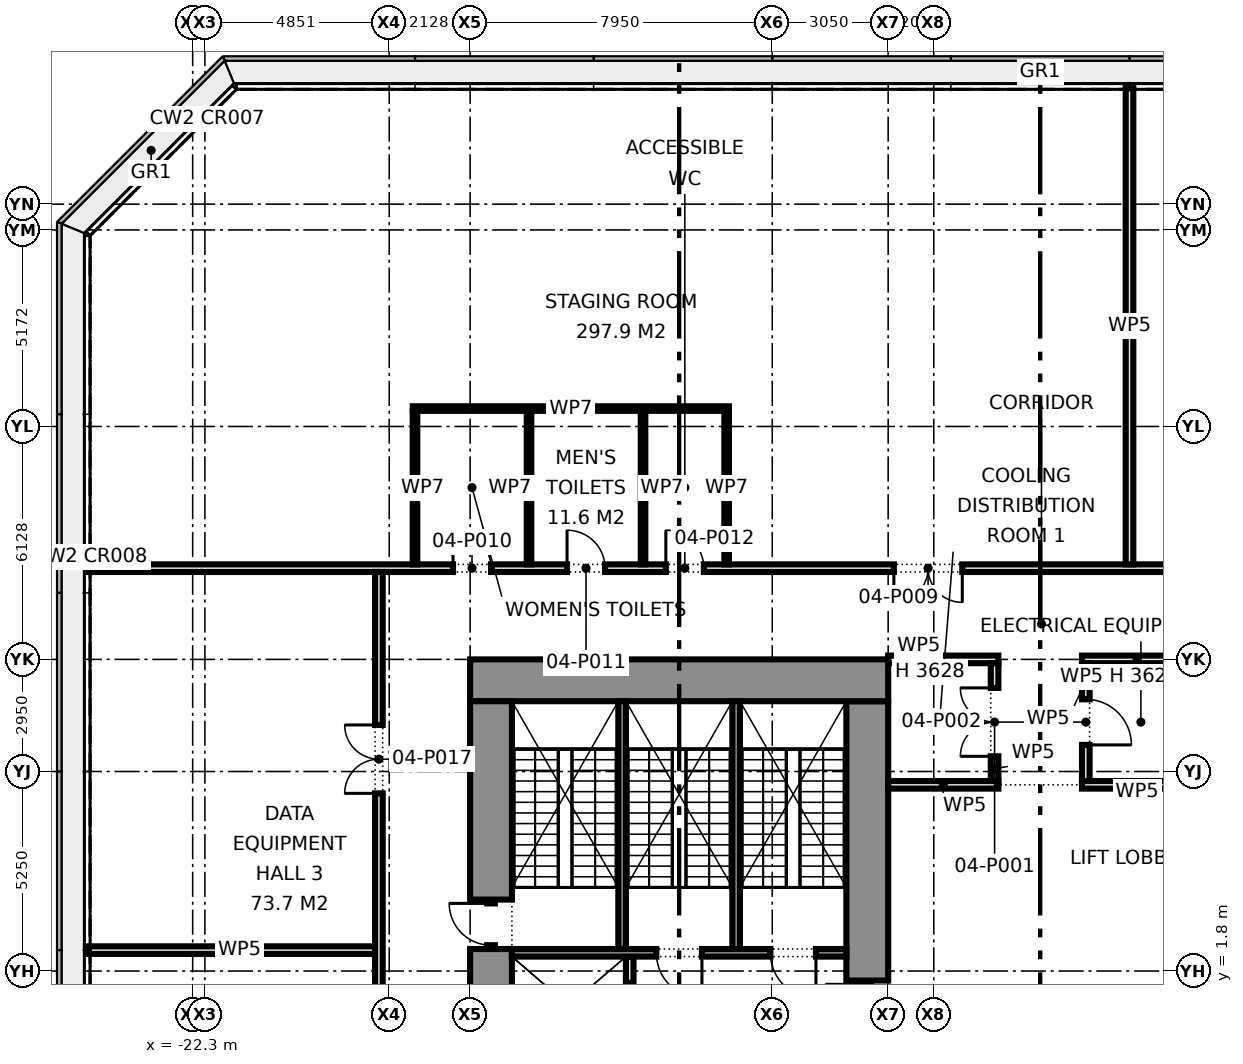
"""IFC4 building model, lengths in metres.
Left out: names, types, materials, properties, quantities, classifications, styles, units other than length and angle.
Written with IfcOpenShell. Run it as: python <this file> out.ifc"""

import sys

from ifc_helpers import new_model, si_unit, direction, frame, frame_2d, origin, place, context, subcontext, project, spatial, rectangle, extrude, element, fill, save


model = new_model("IFC4")
c1 = context("Model", 3, precision=1e-05, world=origin(), true_north=direction((0.0, 1.0)))
c2 = subcontext(c1, "Body", "Model", "MODEL_VIEW")
j1 = project(units=[si_unit("LENGTHUNIT", "METRE"), si_unit("PLANEANGLEUNIT", "RADIAN")], contexts=[c1])
p1 = place(None, origin())
s1 = spatial("IfcSite", under=j1, at=p1, CompositionType="ELEMENT")
p2 = place(p1, origin())
s2 = spatial("IfcBuilding", under=s1, at=p2, CompositionType="ELEMENT")
p3 = place(p2, frame((0.0, 0.0, 16.1)))
s3 = spatial("IfcBuildingStorey", under=s2, at=p3, CompositionType="ELEMENT", Elevation=16.1)
p4 = place(p3, frame((-15.0, 9.45, 0.0), z_axis=(0.0, 0.0, 1.0), x_axis=(1.0, 0.0, 0.0)))
e1 = element("IfcWall", 1, at=p4, inside=s3, PredefinedType="SHEAR", context=c2, shape_type="SweptSolid", body=[
    extrude(rectangle(XDim=11.0, YDim=1.1, at=frame_2d((5.5, 0.0))), origin(), (0.0, 0.0, 1.0), 4.575),
])
p5 = place(p3, frame((-14.45, -3.75, 0.0), z_axis=(0.0, 0.0, 1.0), x_axis=(0.0, 1.0, 0.0)))
e2 = element("IfcWall", 2, at=p5, inside=s3, PredefinedType="SHEAR", context=c2, shape_type="SweptSolid", body=[
    extrude(rectangle(XDim=6.13, YDim=1.1, at=frame_2d((3.065, 0.0))), origin(), (0.0, 0.0, 1.0), 4.575),
])
p6 = place(p3, frame((-14.45, 2.38, 0.0), z_axis=(0.0, 0.0, 1.0), x_axis=(0.0, 1.0, 0.0)))
e3 = element("IfcWall", 3, at=p6, inside=s3, PredefinedType="SHEAR", context=c2, shape_type="SweptSolid", body=[
    extrude(rectangle(XDim=1.3, YDim=0.2, at=frame_2d((0.65, 0.0))), origin(), (0.0, 0.0, 1.0), 2.4),
])
p7 = place(p6, frame((0.1, 0.0, 0.0)))
e4 = element("IfcOpeningElement", 4, at=p7, cuts=e3, PredefinedType="OPENING", context=c2, shape_type="SweptSolid", body=[
    extrude(rectangle(XDim=1.1, YDim=2.1, at=frame_2d((0.55, 1.05))), frame((0.0, 0.11, 0.0), z_axis=(0.0, -1.0, 0.0), x_axis=(1.0, 0.0, 0.0)), (0.0, 0.0, 1.0), 0.22),
])
p8 = place(p3, frame((-14.45, 3.68, 0.0), z_axis=(0.0, 0.0, 1.0), x_axis=(0.0, 1.0, 0.0)))
e5 = element("IfcWall", 5, at=p8, inside=s3, PredefinedType="SHEAR", context=c2, shape_type="SweptSolid", body=[
    extrude(rectangle(XDim=5.22, YDim=1.1, at=frame_2d((2.61, 0.0))), origin(), (0.0, 0.0, 1.0), 4.575),
])
p9 = place(p3, frame((-4.55, 0.25, 0.0), z_axis=(0.0, 0.0, 1.0), x_axis=(0.0, 1.0, 0.0)))
e6 = element("IfcWall", 6, at=p9, inside=s3, PredefinedType="PARTITIONING", context=c2, shape_type="SweptSolid", body=[
    extrude(rectangle(XDim=1.3, YDim=0.2, at=frame_2d((0.65, 0.0))), origin(), (0.0, 0.0, 1.0), 2.4),
])
p10 = place(p9, frame((0.1, 0.0, 0.0)))
e7 = element("IfcOpeningElement", 7, at=p10, cuts=e6, PredefinedType="OPENING", context=c2, shape_type="SweptSolid", body=[
    extrude(rectangle(XDim=1.1, YDim=2.1, at=frame_2d((0.55, 1.05))), frame((0.0, 0.11, 0.0), z_axis=(0.0, -1.0, 0.0), x_axis=(1.0, 0.0, 0.0)), (0.0, 0.0, 1.0), 0.22),
])
p11 = place(p3, frame((-4.55, 1.55, 0.0), z_axis=(0.0, 0.0, 1.0), x_axis=(0.0, 1.0, 0.0)))
e8 = element("IfcWall", 8, at=p11, inside=s3, PredefinedType="SHEAR", context=c2, shape_type="SweptSolid", body=[
    extrude(rectangle(XDim=7.35, YDim=1.1, at=frame_2d((3.675, 0.0))), origin(), (0.0, 0.0, 1.0), 4.575),
])
p12 = place(p3, frame((-10.8, -0.4, 0.0), z_axis=(0.0, 0.0, 1.0), x_axis=(0.0, 1.0, 0.0)))
e9 = element("IfcWall", 9, at=p12, inside=s3, PredefinedType="PARTITIONING", context=c2, shape_type="SweptSolid", body=[
    extrude(rectangle(XDim=2.58, YDim=0.2, at=frame_2d((1.29, 0.0))), origin(), (0.0, 0.0, 1.0), 4.575),
])
p13 = place(p12, frame((0.69, 0.0, 0.0)))
e10 = element("IfcOpeningElement", 10, at=p13, cuts=e9, PredefinedType="OPENING", context=c2, shape_type="SweptSolid", body=[
    extrude(rectangle(XDim=1.2, YDim=2.1, at=frame_2d((0.6, 1.05))), frame((0.0, 0.11, 0.0), z_axis=(0.0, -1.0, 0.0), x_axis=(1.0, 0.0, 0.0)), (0.0, 0.0, 1.0), 0.22),
])
p14 = place(p3, frame((-13.9, 2.28, 0.0), z_axis=(0.0, 0.0, 1.0), x_axis=(1.0, 0.0, 0.0)))
e11 = element("IfcWall", 11, at=p14, inside=s3, PredefinedType="SHEAR", context=c2, shape_type="SweptSolid", body=[
    extrude(rectangle(XDim=8.8, YDim=0.2, at=frame_2d((4.4, 0.0))), origin(), (0.0, 0.0, 1.0), 4.575),
])
p15 = place(p14, frame((3.8, 0.0, 0.0)))
e12 = element("IfcOpeningElement", 12, at=p15, cuts=e11, PredefinedType="OPENING", context=c2, shape_type="SweptSolid", body=[
    extrude(rectangle(XDim=1.2, YDim=2.1, at=frame_2d((0.6, 1.05))), frame((0.0, 0.11, 0.0), z_axis=(0.0, -1.0, 0.0), x_axis=(1.0, 0.0, 0.0)), (0.0, 0.0, 1.0), 0.22),
])
p16 = place(p14, frame((6.8, 0.0, 0.0)))
e13 = element("IfcOpeningElement", 13, at=p16, cuts=e11, PredefinedType="OPENING", context=c2, shape_type="SweptSolid", body=[
    extrude(rectangle(XDim=1.2, YDim=2.1, at=frame_2d((0.6, 1.05))), frame((0.0, 0.11, 0.0), z_axis=(0.0, -1.0, 0.0), x_axis=(1.0, 0.0, 0.0)), (0.0, 0.0, 1.0), 0.22),
])
for number, where, z_axis, x_axis in (
    (14, (-11.0, 2.38, 0.0), (0.0, 0.0, 1.0), (0.0, 1.0, 0.0)),
    (15, (-8.0, 2.38, 0.0), (0.0, 0.0, 1.0), (0.0, 1.0, 0.0)),
):
    element("IfcWall", number, at=place(p3, frame(where, z_axis=z_axis, x_axis=x_axis)), inside=s3, PredefinedType="SHEAR", context=c2, shape_type="SweptSolid", body=[
        extrude(rectangle(XDim=6.52, YDim=0.2, at=frame_2d((3.26, 0.0))), origin(), (0.0, 0.0, 1.0), 4.575),
    ])
p17 = place(p3, frame((-25.03, 2.35, 0.0), z_axis=(0.0, 0.0, 1.0), x_axis=(1.0, 0.0, 0.0)))
e16 = element("IfcWall", 16, at=p17, inside=s3, PredefinedType="PARTITIONING", context=c2, shape_type="SweptSolid", body=[
    extrude(rectangle(XDim=7.53, YDim=0.2, at=frame_2d((3.765, 0.0))), origin(), (0.0, 0.0, 1.0), 4.575),
])
for number, where, z_axis, x_axis in (
    (17, (-4.0, 6.7, 0.0), (0.0, 0.0, 1.0), (1.0, 0.0, 0.0)),
    (18, (1.1, 6.7, 0.0), (0.0, 0.0, 1.0), (1.0, 0.0, 0.0)),
):
    element("IfcWall", number, at=place(p3, frame(where, z_axis=z_axis, x_axis=x_axis)), inside=s3, PredefinedType="PARTITIONING", context=c2, shape_type="SweptSolid", body=[
        extrude(rectangle(XDim=2.9, YDim=0.2, at=frame_2d((1.45, 0.0))), origin(), (0.0, 0.0, 1.0), 4.575),
    ])
for number, where, z_axis, x_axis in (
    (19, (-4.0, 10.0, 0.0), (0.0, 0.0, 1.0), (1.0, 0.0, 0.0)),
    (20, (1.1, 10.0, 0.0), (0.0, 0.0, 1.0), (1.0, 0.0, 0.0)),
):
    element("IfcWall", number, at=place(p3, frame(where, z_axis=z_axis, x_axis=x_axis)), inside=s3, PredefinedType="PARTITIONING", context=c2, shape_type="SweptSolid", body=[
        extrude(rectangle(XDim=2.9, YDim=0.2, at=frame_2d((1.45, 0.0))), origin(), (0.0, 0.0, 1.0), 3.627),
    ])
p18 = place(p3, frame((-25.03, 12.4, 0.0), z_axis=(0.0, 0.0, 1.0), x_axis=(1.0, 0.0, 0.0)))
e21 = element("IfcWall", 21, at=p18, inside=s3, PredefinedType="PARTITIONING", context=c2, shape_type="SweptSolid", body=[
    extrude(rectangle(XDim=50.06, YDim=0.2, at=frame_2d((25.03, 0.0))), origin(), (0.0, 0.0, 1.0), 4.575),
])
p19 = place(p18, frame((21.18, 0.0, 0.0)))
e22 = element("IfcOpeningElement", 22, at=p19, cuts=e21, PredefinedType="OPENING", context=c2, shape_type="SweptSolid", body=[
    extrude(rectangle(XDim=1.8, YDim=2.1, at=frame_2d((0.9, 1.05))), frame((0.0, 0.11, 0.0), z_axis=(0.0, -1.0, 0.0), x_axis=(1.0, 0.0, 0.0)), (0.0, 0.0, 1.0), 0.22),
])
p20 = place(p18, frame((9.58, 0.0, 0.0)))
e23 = element("IfcOpeningElement", 23, at=p20, cuts=e21, PredefinedType="OPENING", context=c2, shape_type="SweptSolid", body=[
    extrude(rectangle(XDim=1.0, YDim=2.1, at=frame_2d((0.5, 1.05))), frame((0.0, 0.11, 0.0), z_axis=(0.0, -1.0, 0.0), x_axis=(1.0, 0.0, 0.0)), (0.0, 0.0, 1.0), 0.22),
])
p21 = place(p18, frame((12.58, 0.0, 0.0)))
e24 = element("IfcOpeningElement", 24, at=p21, cuts=e21, PredefinedType="OPENING", context=c2, shape_type="SweptSolid", body=[
    extrude(rectangle(XDim=1.0, YDim=2.1, at=frame_2d((0.5, 1.05))), frame((0.0, 0.11, 0.0), z_axis=(0.0, -1.0, 0.0), x_axis=(1.0, 0.0, 0.0)), (0.0, 0.0, 1.0), 0.22),
])
p22 = place(p18, frame((15.18, 0.0, 0.0)))
e25 = element("IfcOpeningElement", 25, at=p22, cuts=e21, PredefinedType="OPENING", context=c2, shape_type="SweptSolid", body=[
    extrude(rectangle(XDim=1.0, YDim=2.1, at=frame_2d((0.5, 1.05))), frame((0.0, 0.11, 0.0), z_axis=(0.0, -1.0, 0.0), x_axis=(1.0, 0.0, 0.0)), (0.0, 0.0, 1.0), 0.22),
])
p23 = place(p18, frame((34.01, 0.0, 0.0)))
e26 = element("IfcOpeningElement", 26, at=p23, cuts=e21, PredefinedType="OPENING", context=c2, shape_type="SweptSolid", body=[
    extrude(rectangle(XDim=1.8, YDim=2.1, at=frame_2d((0.9, 1.05))), frame((0.0, 0.11, 0.0), z_axis=(0.0, -1.0, 0.0), x_axis=(1.0, 0.0, 0.0)), (0.0, 0.0, 1.0), 0.22),
])
p24 = place(p3, frame((2.35, 12.5, 0.0), z_axis=(0.0, 0.0, 1.0), x_axis=(0.0, 1.0, 0.0)))
e27 = element("IfcWall", 27, at=p24, inside=s3, PredefinedType="PARTITIONING", context=c2, shape_type="SweptSolid", body=[
    extrude(rectangle(XDim=12.53, YDim=0.2, at=frame_2d((6.265, 0.0))), origin(), (0.0, 0.0, 1.0), 4.575),
])
p25 = place(p3, frame((1.2, 6.8, 0.0), z_axis=(0.0, 0.0, 1.0), x_axis=(0.0, 1.0, 0.0)))
e28 = element("IfcWall", 28, at=p25, inside=s3, PredefinedType="PARTITIONING", context=c2, shape_type="SweptSolid", body=[
    extrude(rectangle(XDim=3.1, YDim=0.2, at=frame_2d((1.55, 0.0))), origin(), (0.0, 0.0, 1.0), 4.575),
])
p26 = place(p25, frame((0.95, 0.0, 0.0)))
e29 = element("IfcOpeningElement", 29, at=p26, cuts=e28, PredefinedType="OPENING", context=c2, shape_type="SweptSolid", body=[
    extrude(rectangle(XDim=1.2, YDim=2.1, at=frame_2d((0.6, 1.05))), frame((0.0, 0.11, 0.0), z_axis=(0.0, -1.0, 0.0), x_axis=(1.0, 0.0, 0.0)), (0.0, 0.0, 1.0), 0.22),
])
p27 = place(p3, frame((-1.2, 6.8, 0.0), z_axis=(0.0, 0.0, 1.0), x_axis=(0.0, 1.0, 0.0)))
e30 = element("IfcWall", 30, at=p27, inside=s3, PredefinedType="PARTITIONING", context=c2, shape_type="SweptSolid", body=[
    extrude(rectangle(XDim=3.1, YDim=0.2, at=frame_2d((1.55, 0.0))), origin(), (0.0, 0.0, 1.0), 4.575),
])
p28 = place(p27, frame((0.65, 0.0, 0.0)))
e31 = element("IfcOpeningElement", 31, at=p28, cuts=e30, PredefinedType="OPENING", context=c2, shape_type="SweptSolid", body=[
    extrude(rectangle(XDim=1.8, YDim=2.1, at=frame_2d((0.9, 1.05))), frame((0.0, 0.11, 0.0), z_axis=(0.0, -1.0, 0.0), x_axis=(1.0, 0.0, 0.0)), (0.0, 0.0, 1.0), 0.22),
])
p29 = place(p3, frame((-17.4, -12.3, 0.0), z_axis=(0.0, 0.0, 1.0), x_axis=(0.0, 1.0, 0.0)))
e32 = element("IfcWall", 32, at=p29, inside=s3, PredefinedType="PARTITIONING", context=c2, shape_type="SweptSolid", body=[
    extrude(rectangle(XDim=24.6, YDim=0.2, at=frame_2d((12.3, 0.0))), origin(), (0.0, 0.0, 1.0), 4.575),
])
p30 = place(p29, frame((6.675, 0.0, 0.0)))
e33 = element("IfcOpeningElement", 33, at=p30, cuts=e32, PredefinedType="OPENING", context=c2, shape_type="SweptSolid", body=[
    extrude(rectangle(XDim=1.2, YDim=2.1, at=frame_2d((0.6, 1.05))), frame((0.0, 0.11, 0.0), z_axis=(0.0, -1.0, 0.0), x_axis=(1.0, 0.0, 0.0)), (0.0, 0.0, 1.0), 0.22),
])
p31 = place(p29, frame((18.775, 0.0, 0.0)))
e34 = element("IfcOpeningElement", 34, at=p31, cuts=e32, PredefinedType="OPENING", context=c2, shape_type="SweptSolid", body=[
    extrude(rectangle(XDim=1.8, YDim=2.1, at=frame_2d((0.9, 1.05))), frame((0.0, 0.11, 0.0), z_axis=(0.0, -1.0, 0.0), x_axis=(1.0, 0.0, 0.0)), (0.0, 0.0, 1.0), 0.22),
])
p32 = place(p3, frame((-16.509, 16.6, 0.0), z_axis=(0.0, 0.0, 1.0), x_axis=(1.0, 0.0, 0.0)))
e35 = element("IfcWall", 35, at=p32, inside=s3, PredefinedType="PARTITIONING", context=c2, shape_type="SweptSolid", body=[
    extrude(rectangle(XDim=8.318, YDim=0.12, at=frame_2d((4.159, 0.0))), origin(), (0.0, 0.0, 1.0), 4.575),
])
p33 = place(p3, frame((-8.25, 12.5, 0.0), z_axis=(0.0, 0.0, 1.0), x_axis=(0.0, 1.0, 0.0)))
e36 = element("IfcWall", 36, at=p33, inside=s3, PredefinedType="PARTITIONING", context=c2, shape_type="SweptSolid", body=[
    extrude(rectangle(XDim=4.039, YDim=0.12, at=frame_2d((2.02, 0.0))), origin(), (0.0, 0.0, 1.0), 4.575),
])
for number, where, z_axis, x_axis in (
    (37, (-10.45, 12.5, 0.0), (0.0, 0.0, 1.0), (0.0, 1.0, 0.0)),
    (38, (-13.45, 12.5, 0.0), (0.0, 0.0, 1.0), (0.0, 1.0, 0.0)),
):
    element("IfcWall", number, at=place(p3, frame(where, z_axis=z_axis, x_axis=x_axis)), inside=s3, PredefinedType="PARTITIONING", context=c2, shape_type="SweptSolid", body=[
        extrude(rectangle(XDim=4.04, YDim=0.12, at=frame_2d((2.02, 0.0))), origin(), (0.0, 0.0, 1.0), 4.575),
    ])
p34 = place(p3, frame((-16.45, 12.5, 0.0), z_axis=(0.0, 0.0, 1.0), x_axis=(0.0, 1.0, 0.0)))
e39 = element("IfcWall", 39, at=p34, inside=s3, PredefinedType="PARTITIONING", context=c2, shape_type="SweptSolid", body=[
    extrude(rectangle(XDim=4.039, YDim=0.12, at=frame_2d((2.02, 0.0))), origin(), (0.0, 0.0, 1.0), 4.575),
])
p35 = place(p7, origin())
e40 = element("IfcDoor", 40, at=p35, inside=s3, OperationType="SINGLE_SWING_RIGHT", PredefinedType="DOOR", context=c2, shape_type="SweptSolid", body=[
    extrude(rectangle(XDim=1.1, YDim=2.1, at=frame_2d((0.55, 1.05))), frame((0.0, 0.025, 0.0), z_axis=(0.0, -1.0, 0.0), x_axis=(1.0, 0.0, 0.0)), (0.0, 0.0, 1.0), 0.05),
])
fill(e4, e40)
p36 = place(p10, origin())
e41 = element("IfcDoor", 41, at=p36, inside=s3, OperationType="SINGLE_SWING_RIGHT", PredefinedType="DOOR", context=c2, shape_type="SweptSolid", body=[
    extrude(rectangle(XDim=1.1, YDim=2.1, at=frame_2d((0.55, 1.05))), frame((0.0, 0.025, 0.0), z_axis=(0.0, -1.0, 0.0), x_axis=(1.0, 0.0, 0.0)), (0.0, 0.0, 1.0), 0.05),
])
fill(e7, e41)
p37 = place(p13, origin())
e42 = element("IfcDoor", 42, at=p37, inside=s3, OperationType="DOUBLE_DOOR_SLIDING", PredefinedType="DOOR", context=c2, shape_type="SweptSolid", body=[
    extrude(rectangle(XDim=1.2, YDim=2.1, at=frame_2d((0.6, 1.05))), frame((0.0, 0.025, 0.0), z_axis=(0.0, -1.0, 0.0), x_axis=(1.0, 0.0, 0.0)), (0.0, 0.0, 1.0), 0.05),
])
fill(e10, e42)
p38 = place(p15, frame((1.2, 0.0, 0.0), z_axis=(0.0, 0.0, 1.0), x_axis=(-1.0, 0.0, 0.0)))
e43 = element("IfcDoor", 43, at=p38, inside=s3, OperationType="SINGLE_SWING_LEFT", PredefinedType="DOOR", context=c2, shape_type="SweptSolid", body=[
    extrude(rectangle(XDim=1.2, YDim=2.1, at=frame_2d((0.6, 1.05))), frame((0.0, 0.025, 0.0), z_axis=(0.0, -1.0, 0.0), x_axis=(1.0, 0.0, 0.0)), (0.0, 0.0, 1.0), 0.05),
])
fill(e12, e43)
p39 = place(p16, frame((1.2, 0.0, 0.0), z_axis=(0.0, 0.0, 1.0), x_axis=(-1.0, 0.0, 0.0)))
e44 = element("IfcDoor", 44, at=p39, inside=s3, OperationType="SINGLE_SWING_LEFT", PredefinedType="DOOR", context=c2, shape_type="SweptSolid", body=[
    extrude(rectangle(XDim=1.2, YDim=2.1, at=frame_2d((0.6, 1.05))), frame((0.0, 0.025, 0.0), z_axis=(0.0, -1.0, 0.0), x_axis=(1.0, 0.0, 0.0)), (0.0, 0.0, 1.0), 0.05),
])
fill(e13, e44)
p40 = place(p28, origin())
e45 = element("IfcDoor", 45, at=p40, inside=s3, OperationType="DOUBLE_DOOR_SINGLE_SWING", PredefinedType="DOOR", context=c2, shape_type="SweptSolid", body=[
    extrude(rectangle(XDim=1.8, YDim=2.1, at=frame_2d((0.9, 1.05))), frame((0.0, 0.025, 0.0), z_axis=(0.0, -1.0, 0.0), x_axis=(1.0, 0.0, 0.0)), (0.0, 0.0, 1.0), 0.05),
])
fill(e31, e45)
p41 = place(p26, frame((1.2, 0.0, 0.0), z_axis=(0.0, 0.0, 1.0), x_axis=(-1.0, 0.0, 0.0)))
e46 = element("IfcDoor", 46, at=p41, inside=s3, OperationType="SINGLE_SWING_RIGHT", PredefinedType="DOOR", context=c2, shape_type="SweptSolid", body=[
    extrude(rectangle(XDim=1.2, YDim=2.1, at=frame_2d((0.6, 1.05))), frame((0.0, 0.025, 0.0), z_axis=(0.0, -1.0, 0.0), x_axis=(1.0, 0.0, 0.0)), (0.0, 0.0, 1.0), 0.05),
])
fill(e29, e46)
p42 = place(p19, frame((1.8, 0.0, 0.0), z_axis=(0.0, 0.0, 1.0), x_axis=(-1.0, 0.0, 0.0)))
e47 = element("IfcDoor", 47, at=p42, inside=s3, OperationType="DOUBLE_DOOR_SINGLE_SWING", PredefinedType="DOOR", context=c2, shape_type="SweptSolid", body=[
    extrude(rectangle(XDim=1.8, YDim=2.1, at=frame_2d((0.9, 1.05))), frame((0.0, 0.025, 0.0), z_axis=(0.0, -1.0, 0.0), x_axis=(1.0, 0.0, 0.0)), (0.0, 0.0, 1.0), 0.05),
])
fill(e22, e47)
p43 = place(p20, origin())
e48 = element("IfcDoor", 48, at=p43, inside=s3, OperationType="SINGLE_SWING_LEFT", PredefinedType="DOOR", context=c2, shape_type="SweptSolid", body=[
    extrude(rectangle(XDim=1.0, YDim=2.1, at=frame_2d((0.5, 1.05))), frame((0.0, 0.025, 0.0), z_axis=(0.0, -1.0, 0.0), x_axis=(1.0, 0.0, 0.0)), (0.0, 0.0, 1.0), 0.05),
])
fill(e23, e48)
p44 = place(p21, origin())
e49 = element("IfcDoor", 49, at=p44, inside=s3, OperationType="SINGLE_SWING_LEFT", PredefinedType="DOOR", context=c2, shape_type="SweptSolid", body=[
    extrude(rectangle(XDim=1.0, YDim=2.1, at=frame_2d((0.5, 1.05))), frame((0.0, 0.025, 0.0), z_axis=(0.0, -1.0, 0.0), x_axis=(1.0, 0.0, 0.0)), (0.0, 0.0, 1.0), 0.05),
])
fill(e24, e49)
p45 = place(p22, origin())
e50 = element("IfcDoor", 50, at=p45, inside=s3, OperationType="SINGLE_SWING_LEFT", PredefinedType="DOOR", context=c2, shape_type="SweptSolid", body=[
    extrude(rectangle(XDim=1.0, YDim=2.1, at=frame_2d((0.5, 1.05))), frame((0.0, 0.025, 0.0), z_axis=(0.0, -1.0, 0.0), x_axis=(1.0, 0.0, 0.0)), (0.0, 0.0, 1.0), 0.05),
])
fill(e25, e50)
p46 = place(p31, origin())
e51 = element("IfcDoor", 51, at=p46, inside=s3, OperationType="DOUBLE_DOOR_SINGLE_SWING", PredefinedType="DOOR", context=c2, shape_type="SweptSolid", body=[
    extrude(rectangle(XDim=1.8, YDim=2.1, at=frame_2d((0.9, 1.05))), frame((0.0, 0.025, 0.0), z_axis=(0.0, -1.0, 0.0), x_axis=(1.0, 0.0, 0.0)), (0.0, 0.0, 1.0), 0.05),
])
fill(e34, e51)
save(model, sys.argv[1])
